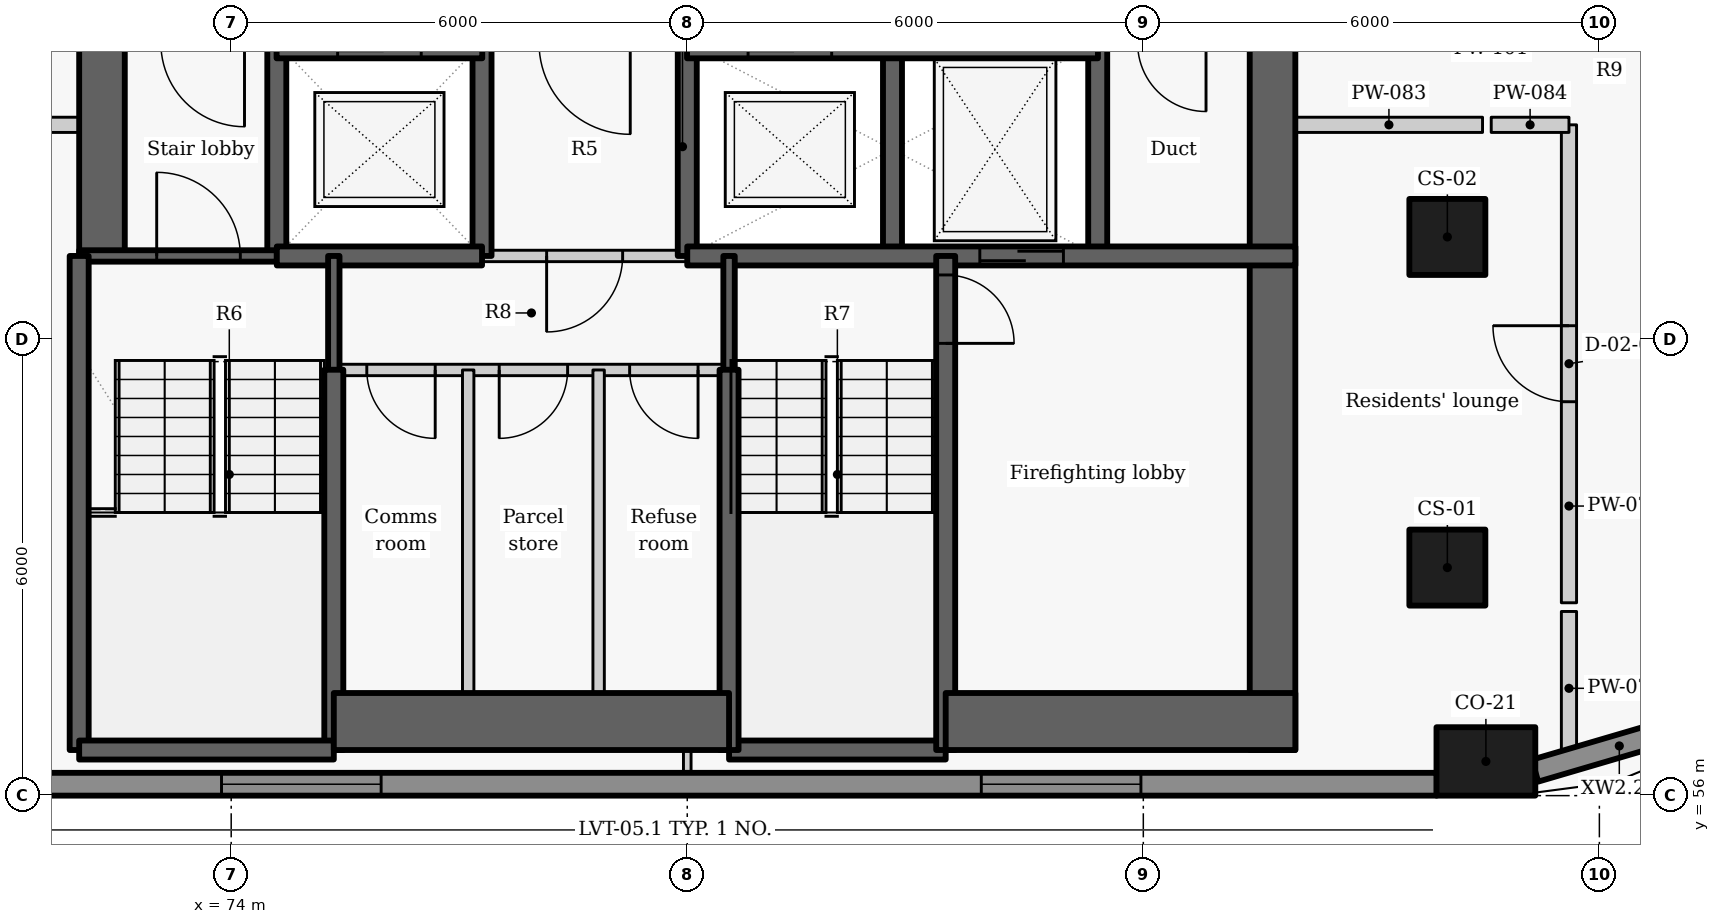
"""IFC4 building model, lengths in metres.
Left out: names, types, materials, properties, quantities, classifications, styles, units other than length and angle.
Written with IfcOpenShell. Run it as: python <this file> out.ifc"""

import sys

from ifc_helpers import new_model, si_unit, direction, frame, frame_2d, origin, origin_2d, place, context, subcontext, project, spatial, rectangle, extrude, element, fill, save


model = new_model("IFC4")
c1 = context("Model", 3, precision=1e-05, world=origin(), true_north=direction((0.0, 1.0)))
c2 = subcontext(c1, "Body", "Model", "MODEL_VIEW")
j1 = project(units=[si_unit("LENGTHUNIT", "METRE"), si_unit("PLANEANGLEUNIT", "RADIAN")], contexts=[c1])
p1 = place(None, origin())
s1 = spatial("IfcSite", under=j1, at=p1, CompositionType="ELEMENT")
p2 = place(p1, origin())
s2 = spatial("IfcBuilding", under=s1, at=p2, CompositionType="ELEMENT")
p3 = place(p2, frame((0.0, 0.0, 127.2)))
s3 = spatial("IfcBuildingStorey", under=s2, at=p3, CompositionType="ELEMENT", Elevation=127.2)
p4 = place(p3, frame((90.507, 56.45, 0.0), z_axis=(0.0, 0.0, 1.0), x_axis=(1.0, 0.0, 0.0)))
e1 = element("IfcColumn", 1, at=p4, inside=s3, PredefinedType="COLUMN", context=c2, shape_type="SweptSolid", body=[
    extrude(rectangle(XDim=1.3, YDim=0.9, at=origin_2d()), origin(), (0.0, 0.0, 1.0), 3.3),
])
for number, where, z_axis, x_axis in (
    (2, (90.0, 59.0, 0.0), (0.0, 0.0, 1.0), (0.0, 1.0, 0.0)),
    (3, (90.0, 63.35, 0.0), (0.0, 0.0, 1.0), (0.0, 1.0, 0.0)),
):
    element("IfcColumn", number, at=place(p3, frame(where, z_axis=z_axis, x_axis=x_axis)), inside=s3, PredefinedType="COLUMN", context=c2, shape_type="SweptSolid", body=[
        extrude(rectangle(XDim=1.0, YDim=1.0, at=origin_2d()), origin(), (0.0, 0.0, 1.0), 3.3),
    ])
p5 = place(p3, frame((69.821, 56.15, 0.0), z_axis=(0.0, 0.0, 1.0), x_axis=(1.0, 0.0, 0.0)))
e4 = element("IfcWall", 4, at=p5, inside=s3, PredefinedType="SOLIDWALL", context=c2, shape_type="SweptSolid", body=[
    extrude(rectangle(XDim=20.04, YDim=0.3, at=frame_2d((10.02, 0.0))), origin(), (0.0, 0.0, 1.0), 2.425),
])
p6 = place(p5, frame((4.051, 0.0, 0.9)))
e5 = element("IfcOpeningElement", 5, at=p6, cuts=e4, PredefinedType="OPENING", context=c2, shape_type="SweptSolid", body=[
    extrude(rectangle(XDim=2.1, YDim=1.1, at=frame_2d((1.05, 0.55))), frame((0.0, 0.16, 0.0), z_axis=(0.0, -1.0, 0.0), x_axis=(1.0, 0.0, 0.0)), (0.0, 0.0, 1.0), 0.32),
])
p7 = place(p5, frame((14.047, 0.0, 0.9)))
e6 = element("IfcOpeningElement", 6, at=p7, cuts=e4, PredefinedType="OPENING", context=c2, shape_type="SweptSolid", body=[
    extrude(rectangle(XDim=2.1, YDim=1.1, at=frame_2d((1.05, 0.55))), frame((0.0, 0.16, 0.0), z_axis=(0.0, -1.0, 0.0), x_axis=(1.0, 0.0, 0.0)), (0.0, 0.0, 1.0), 0.32),
])
p8 = place(p3, frame((91.153, 56.328, 0.0), z_axis=(0.0, 0.0, 1.0), x_axis=(0.959473072336, 0.281800325517, 0.0)))
e7 = element("IfcWall", 7, at=p8, inside=s3, PredefinedType="SOLIDWALL", context=c2, shape_type="SweptSolid", body=[
    extrude(rectangle(XDim=2.312, YDim=0.3, at=frame_2d((1.156, 0.0))), origin(), (0.0, 0.0, 1.0), 2.425),
])
p9 = place(p3, frame((74.6, 63.1, -0.41), z_axis=(0.0, 0.0, 1.0), x_axis=(0.0, 1.0, 0.0)))
e8 = element("IfcWall", 8, at=p9, inside=s3, PredefinedType="SHEAR", context=c2, shape_type="SweptSolid", body=[
    extrude(rectangle(XDim=2.8, YDim=0.25, at=frame_2d((1.4, 0.0))), origin(), (0.0, 0.0, 1.0), 3.435),
])
p10 = place(p3, frame((72.3, 63.1, -0.41), z_axis=(0.0, 0.0, 1.0), x_axis=(0.0, 1.0, 0.0)))
e9 = element("IfcWall", 9, at=p10, inside=s3, PredefinedType="SHEAR", context=c2, shape_type="SweptSolid", body=[
    extrude(rectangle(XDim=9.1, YDim=0.6, at=frame_2d((4.55, 0.0))), origin(), (0.0, 0.0, 1.0), 3.435),
])
p11 = place(p10, frame((3.748, 0.0, 0.41)))
e10 = element("IfcOpeningElement", 10, at=p11, cuts=e9, PredefinedType="OPENING", context=c2, shape_type="SweptSolid", body=[
    extrude(rectangle(XDim=1.5, YDim=2.1, at=frame_2d((0.75, 1.05))), frame((0.0, 0.31, 0.0), z_axis=(0.0, -1.0, 0.0), x_axis=(1.0, 0.0, 0.0)), (0.0, 0.0, 1.0), 0.62),
])
for number, where, z_axis, x_axis in (
    (11, (77.3, 63.1, -0.41), (0.0, 0.0, 1.0), (0.0, 1.0, 0.0)),
    (12, (80.0, 63.1, -0.41), (0.0, 0.0, 1.0), (0.0, 1.0, 0.0)),
    (13, (82.7, 63.1, -0.41), (0.0, 0.0, 1.0), (0.0, 1.0, 0.0)),
    (14, (85.4, 63.1, -0.41), (0.0, 0.0, 1.0), (0.0, 1.0, 0.0)),
):
    element("IfcWall", number, at=place(p3, frame(where, z_axis=z_axis, x_axis=x_axis)), inside=s3, PredefinedType="SHEAR", context=c2, shape_type="SweptSolid", body=[
        extrude(rectangle(XDim=2.8, YDim=0.25, at=frame_2d((1.4, 0.0))), origin(), (0.0, 0.0, 1.0), 3.435),
    ])
p12 = place(p3, frame((87.7, 72.2, -0.41), z_axis=(0.0, 0.0, 1.0), x_axis=(0.0, -1.0, 0.0)))
e15 = element("IfcWall", 15, at=p12, inside=s3, PredefinedType="SHEAR", context=c2, shape_type="SweptSolid", body=[
    extrude(rectangle(XDim=15.6, YDim=0.6, at=frame_2d((7.8, 0.0))), origin(), (0.0, 0.0, 1.0), 3.435),
])
p13 = place(p12, frame((3.852, 0.0, 0.41)))
e16 = element("IfcOpeningElement", 16, at=p13, cuts=e15, PredefinedType="OPENING", context=c2, shape_type="SweptSolid", body=[
    extrude(rectangle(XDim=1.5, YDim=2.1, at=frame_2d((0.75, 1.05))), frame((0.0, 0.31, 0.0), z_axis=(0.0, -1.0, 0.0), x_axis=(1.0, 0.0, 0.0)), (0.0, 0.0, 1.0), 0.62),
])
p14 = place(p3, frame((74.597, 65.9, -0.41), z_axis=(0.0, 0.0, 1.0), x_axis=(1.0, 0.0, 0.0)))
e17 = element("IfcWall", 17, at=p14, inside=s3, PredefinedType="SHEAR", context=c2, shape_type="SweptSolid", body=[
    extrude(rectangle(XDim=2.706, YDim=0.4, at=frame_2d((1.353, 0.0))), origin(), (0.0, 0.0, 1.0), 3.435),
])
p15 = place(p14, frame((0.803, 0.0, 0.41)))
e18 = element("IfcOpeningElement", 18, at=p15, cuts=e17, PredefinedType="OPENING", context=c2, shape_type="SweptSolid", body=[
    extrude(rectangle(XDim=1.1, YDim=2.1, at=frame_2d((0.55, 1.05))), frame((0.0, 0.21, 0.0), z_axis=(0.0, -1.0, 0.0), x_axis=(1.0, 0.0, 0.0)), (0.0, 0.0, 1.0), 0.42),
])
p16 = place(p3, frame((79.997, 65.9, -0.41), z_axis=(0.0, 0.0, 1.0), x_axis=(1.0, 0.0, 0.0)))
e19 = element("IfcWall", 19, at=p16, inside=s3, PredefinedType="SHEAR", context=c2, shape_type="SweptSolid", body=[
    extrude(rectangle(XDim=5.406, YDim=0.4, at=frame_2d((2.703, 0.0))), origin(), (0.0, 0.0, 1.0), 3.435),
])
p17 = place(p16, frame((0.803, 0.0, 0.41)))
e20 = element("IfcOpeningElement", 20, at=p17, cuts=e19, PredefinedType="OPENING", context=c2, shape_type="SweptSolid", body=[
    extrude(rectangle(XDim=1.1, YDim=2.1, at=frame_2d((0.55, 1.05))), frame((0.0, 0.21, 0.0), z_axis=(0.0, -1.0, 0.0), x_axis=(1.0, 0.0, 0.0)), (0.0, 0.0, 1.0), 0.42),
])
p18 = place(p3, frame((72.0, 63.1, -0.41), z_axis=(0.0, 0.0, 1.0), x_axis=(1.0, 0.0, 0.0)))
e21 = element("IfcWall", 21, at=p18, inside=s3, PredefinedType="SHEAR", context=c2, shape_type="SweptSolid", body=[
    extrude(rectangle(XDim=2.6, YDim=0.15, at=frame_2d((1.3, 0.0))), origin(), (0.0, 0.0, 1.0), 3.435),
])
p19 = place(p18, frame((1.02, 0.0, 0.41)))
e22 = element("IfcOpeningElement", 22, at=p19, cuts=e21, PredefinedType="OPENING", context=c2, shape_type="SweptSolid", body=[
    extrude(rectangle(XDim=1.1, YDim=2.1, at=frame_2d((0.55, 1.05))), frame((0.0, 0.085, 0.0), z_axis=(0.0, -1.0, 0.0), x_axis=(1.0, 0.0, 0.0)), (0.0, 0.0, 1.0), 0.17),
])
p20 = place(p3, frame((74.6, 63.1, -0.41), z_axis=(0.0, 0.0, 1.0), x_axis=(1.0, 0.0, 0.0)))
e23 = element("IfcWall", 23, at=p20, inside=s3, PredefinedType="SHEAR", context=c2, shape_type="SweptSolid", body=[
    extrude(rectangle(XDim=2.7, YDim=0.25, at=frame_2d((1.35, 0.0))), origin(), (0.0, 0.0, 1.0), 3.435),
])
p21 = place(p3, frame((80.0, 63.1, -0.41), z_axis=(0.0, 0.0, 1.0), x_axis=(1.0, 0.0, 0.0)))
e24 = element("IfcWall", 24, at=p21, inside=s3, PredefinedType="SHEAR", context=c2, shape_type="SweptSolid", body=[
    extrude(rectangle(XDim=8.0, YDim=0.25, at=frame_2d((4.0, 0.0))), origin(), (0.0, 0.0, 1.0), 3.435),
])
p22 = place(p21, frame((3.849, 0.0, 0.41)))
e25 = element("IfcOpeningElement", 25, at=p22, cuts=e24, PredefinedType="OPENING", context=c2, shape_type="SweptSolid", body=[
    extrude(rectangle(XDim=1.1, YDim=2.1, at=frame_2d((0.55, 1.05))), frame((0.0, 0.135, 0.0), z_axis=(0.0, -1.0, 0.0), x_axis=(1.0, 0.0, 0.0)), (0.0, 0.0, 1.0), 0.27),
])
p23 = place(p3, frame((80.0, 63.1, 0.0), z_axis=(0.0, 0.0, 1.0), x_axis=(-1.0, 0.0, 0.0)))
e26 = element("IfcWall", 26, at=p23, inside=s3, PredefinedType="PARTITIONING", context=c2, shape_type="SweptSolid", body=[
    extrude(rectangle(XDim=2.7, YDim=0.15, at=frame_2d((1.35, 0.0))), origin(), (0.0, 0.0, 1.0), 3.025),
])
p24 = place(p23, frame((0.85, 0.0, 0.0)))
e27 = element("IfcOpeningElement", 27, at=p24, cuts=e26, PredefinedType="OPENING", context=c2, shape_type="SweptSolid", body=[
    extrude(rectangle(XDim=1.0, YDim=2.1, at=frame_2d((0.5, 1.05))), frame((0.0, 0.085, 0.0), z_axis=(0.0, -1.0, 0.0), x_axis=(1.0, 0.0, 0.0)), (0.0, 0.0, 1.0), 0.17),
])
p25 = place(p3, frame((75.35, 61.597, -0.41), z_axis=(0.0, 0.0, 1.0), x_axis=(0.0, 1.0, 0.0)))
e28 = element("IfcWall", 28, at=p25, inside=s3, PredefinedType="SHEAR", context=c2, shape_type="SweptSolid", body=[
    extrude(rectangle(XDim=1.503, YDim=0.15, at=frame_2d((0.751, 0.0))), origin(), (0.0, 0.0, 1.0), 3.435),
])
p26 = place(p3, frame((75.35, 56.6, -0.41), z_axis=(0.0, 0.0, 1.0), x_axis=(0.0, 1.0, 0.0)))
e29 = element("IfcWall", 29, at=p26, inside=s3, PredefinedType="SHEAR", context=c2, shape_type="SweptSolid", body=[
    extrude(rectangle(XDim=5.003, YDim=0.25, at=frame_2d((2.501, 0.0))), origin(), (0.0, 0.0, 1.0), 3.435),
])
p27 = place(p3, frame((72.0, 56.6, -0.41), z_axis=(0.0, 0.0, 1.0), x_axis=(0.0, 1.0, 0.0)))
e30 = element("IfcWall", 30, at=p27, inside=s3, PredefinedType="SHEAR", context=c2, shape_type="SweptSolid", body=[
    extrude(rectangle(XDim=6.5, YDim=0.25, at=frame_2d((3.25, 0.0))), origin(), (0.0, 0.0, 1.0), 3.435),
])
p28 = place(p3, frame((72.0, 56.6, 0.0), z_axis=(0.0, 0.0, 1.0), x_axis=(1.0, 0.0, 0.0)))
e31 = element("IfcWall", 31, at=p28, inside=s3, PredefinedType="SHEAR", context=c2, shape_type="SweptSolid", body=[
    extrude(rectangle(XDim=3.35, YDim=0.25, at=frame_2d((1.675, 0.0))), origin(), (0.0, 0.0, 1.0), 3.025),
])
p29 = place(p3, frame((80.55, 56.6, 0.0), z_axis=(0.0, 0.0, 1.0), x_axis=(1.0, 0.0, 0.0)))
e32 = element("IfcWall", 32, at=p29, inside=s3, PredefinedType="SHEAR", context=c2, shape_type="SweptSolid", body=[
    extrude(rectangle(XDim=2.85, YDim=0.25, at=frame_2d((1.425, 0.0))), origin(), (0.0, 0.0, 1.0), 3.025),
])
p30 = place(p3, frame((83.4, 63.1, -0.41), z_axis=(0.0, 0.0, 1.0), x_axis=(0.0, -1.0, 0.0)))
e33 = element("IfcWall", 33, at=p30, inside=s3, PredefinedType="SHEAR", context=c2, shape_type="SweptSolid", body=[
    extrude(rectangle(XDim=6.5, YDim=0.25, at=frame_2d((3.25, 0.0))), origin(), (0.0, 0.0, 1.0), 3.435),
])
p31 = place(p30, frame((0.25, 0.0, 0.41)))
e34 = element("IfcOpeningElement", 34, at=p31, cuts=e33, PredefinedType="OPENING", context=c2, shape_type="SweptSolid", body=[
    extrude(rectangle(XDim=0.9, YDim=2.1, at=frame_2d((0.45, 1.05))), frame((0.0, 0.135, 0.0), z_axis=(0.0, -1.0, 0.0), x_axis=(1.0, 0.0, 0.0)), (0.0, 0.0, 1.0), 0.27),
])
p32 = place(p3, frame((80.55, 61.597, -0.41), z_axis=(0.0, 0.0, 1.0), x_axis=(0.0, 1.0, 0.0)))
e35 = element("IfcWall", 35, at=p32, inside=s3, PredefinedType="SHEAR", context=c2, shape_type="SweptSolid", body=[
    extrude(rectangle(XDim=1.503, YDim=0.15, at=frame_2d((0.751, 0.0))), origin(), (0.0, 0.0, 1.0), 3.435),
])
p33 = place(p3, frame((80.55, 56.6, -0.41), z_axis=(0.0, 0.0, 1.0), x_axis=(0.0, 1.0, 0.0)))
e36 = element("IfcWall", 36, at=p33, inside=s3, PredefinedType="SHEAR", context=c2, shape_type="SweptSolid", body=[
    extrude(rectangle(XDim=5.003, YDim=0.25, at=frame_2d((2.501, 0.0))), origin(), (0.0, 0.0, 1.0), 3.435),
])
p34 = place(p3, frame((75.35, 56.975, -0.41), z_axis=(0.0, 0.0, 1.0), x_axis=(1.0, 0.0, 0.0)))
e37 = element("IfcWall", 37, at=p34, inside=s3, PredefinedType="SHEAR", context=c2, shape_type="SweptSolid", body=[
    extrude(rectangle(XDim=5.2, YDim=0.75, at=frame_2d((2.6, 0.0))), origin(), (0.0, 0.0, 1.0), 3.435),
])
p35 = place(p3, frame((83.4, 56.975, -0.41), z_axis=(0.0, 0.0, 1.0), x_axis=(1.0, 0.0, 0.0)))
e38 = element("IfcWall", 38, at=p35, inside=s3, PredefinedType="SHEAR", context=c2, shape_type="SweptSolid", body=[
    extrude(rectangle(XDim=4.6, YDim=0.75, at=frame_2d((2.3, 0.0))), origin(), (0.0, 0.0, 1.0), 3.435),
])
p36 = place(p3, frame((80.55, 61.6, 0.0), z_axis=(0.0, 0.0, 1.0), x_axis=(-1.0, 0.0, 0.0)))
e39 = element("IfcWall", 39, at=p36, inside=s3, PredefinedType="PARTITIONING", context=c2, shape_type="SweptSolid", body=[
    extrude(rectangle(XDim=5.2, YDim=0.15, at=frame_2d((2.6, 0.0))), origin(), (0.0, 0.0, 1.0), 3.025),
])
p37 = place(p36, frame((3.866, 0.0, 0.0)))
e40 = element("IfcOpeningElement", 40, at=p37, cuts=e39, PredefinedType="OPENING", context=c2, shape_type="SweptSolid", body=[
    extrude(rectangle(XDim=0.9, YDim=2.1, at=frame_2d((0.45, 1.05))), frame((0.0, 0.085, 0.0), z_axis=(0.0, -1.0, 0.0), x_axis=(1.0, 0.0, 0.0)), (0.0, 0.0, 1.0), 0.17),
])
p38 = place(p36, frame((2.124, 0.0, 0.0)))
e41 = element("IfcOpeningElement", 41, at=p38, cuts=e39, PredefinedType="OPENING", context=c2, shape_type="SweptSolid", body=[
    extrude(rectangle(XDim=0.9, YDim=2.1, at=frame_2d((0.45, 1.05))), frame((0.0, 0.085, 0.0), z_axis=(0.0, -1.0, 0.0), x_axis=(1.0, 0.0, 0.0)), (0.0, 0.0, 1.0), 0.17),
])
p39 = place(p36, frame((0.408, 0.0, 0.0)))
e42 = element("IfcOpeningElement", 42, at=p39, cuts=e39, PredefinedType="OPENING", context=c2, shape_type="SweptSolid", body=[
    extrude(rectangle(XDim=0.9, YDim=2.1, at=frame_2d((0.45, 1.05))), frame((0.0, 0.085, 0.0), z_axis=(0.0, -1.0, 0.0), x_axis=(1.0, 0.0, 0.0)), (0.0, 0.0, 1.0), 0.17),
])
for number, where, z_axis, x_axis in (
    (43, (77.118, 56.6, 0.0), (0.0, 0.0, 1.0), (0.0, 1.0, 0.0)),
    (44, (78.834, 56.6, 0.0), (0.0, 0.0, 1.0), (0.0, 1.0, 0.0)),
):
    element("IfcWall", number, at=place(p3, frame(where, z_axis=z_axis, x_axis=x_axis)), inside=s3, PredefinedType="PARTITIONING", context=c2, shape_type="SweptSolid", body=[
        extrude(rectangle(XDim=5.0, YDim=0.15, at=frame_2d((2.5, 0.0))), origin(), (0.0, 0.0, 1.0), 3.025),
    ])
p40 = place(p3, frame((91.6, 56.401, 0.0), z_axis=(0.0, 0.0, 1.0), x_axis=(0.0, 1.0, 0.0)))
e45 = element("IfcWall", 45, at=p40, inside=s3, PredefinedType="PARTITIONING", context=c2, shape_type="SweptSolid", body=[
    extrude(rectangle(XDim=2.022, YDim=0.2, at=frame_2d((1.011, 0.0))), origin(), (0.0, 0.0, 1.0), 2.405),
])
p41 = place(p3, frame((91.6, 58.537, 0.0), z_axis=(0.0, 0.0, 1.0), x_axis=(0.0, 1.0, 0.0)))
e46 = element("IfcWall", 46, at=p41, inside=s3, PredefinedType="PARTITIONING", context=c2, shape_type="SweptSolid", body=[
    extrude(rectangle(XDim=6.288, YDim=0.2, at=frame_2d((3.144, 0.0))), origin(), (0.0, 0.0, 1.0), 3.025),
])
p42 = place(p41, frame((2.645, 0.0, 0.0)))
e47 = element("IfcOpeningElement", 47, at=p42, cuts=e46, PredefinedType="OPENING", context=c2, shape_type="SweptSolid", body=[
    extrude(rectangle(XDim=1.0, YDim=2.1, at=frame_2d((0.5, 1.05))), frame((0.0, 0.11, 0.0), z_axis=(0.0, -1.0, 0.0), x_axis=(1.0, 0.0, 0.0)), (0.0, 0.0, 1.0), 0.22),
])
p43 = place(p3, frame((70.577, 64.825, 0.0), z_axis=(0.0, 0.0, 1.0), x_axis=(1.0, 0.0, 0.0)))
e48 = element("IfcWall", 48, at=p43, inside=s3, PredefinedType="PARTITIONING", context=c2, shape_type="SweptSolid", body=[
    extrude(rectangle(XDim=1.423, YDim=0.2, at=frame_2d((0.711, 0.0))), origin(), (0.0, 0.0, 1.0), 3.025),
])
p44 = place(p3, frame((88.0, 64.825, 0.0), z_axis=(0.0, 0.0, 1.0), x_axis=(1.0, 0.0, 0.0)))
e49 = element("IfcWall", 49, at=p44, inside=s3, PredefinedType="PARTITIONING", context=c2, shape_type="SweptSolid", body=[
    extrude(rectangle(XDim=2.463, YDim=0.2, at=frame_2d((1.231, 0.0))), origin(), (0.0, 0.0, 1.0), 2.505),
])
p45 = place(p3, frame((90.577, 64.825, 0.0), z_axis=(0.0, 0.0, 1.0), x_axis=(1.0, 0.0, 0.0)))
e50 = element("IfcWall", 50, at=p45, inside=s3, PredefinedType="PARTITIONING", context=c2, shape_type="SweptSolid", body=[
    extrude(rectangle(XDim=1.023, YDim=0.2, at=frame_2d((0.511, 0.0))), origin(), (0.0, 0.0, 1.0), 3.025),
])
p46 = place(p3, frame((80.0, 56.3, 0.0), z_axis=(0.0, 0.0, 1.0), x_axis=(0.0, 1.0, 0.0)))
e51 = element("IfcWall", 51, at=p46, inside=s3, PredefinedType="PARTITIONING", context=c2, shape_type="SweptSolid", body=[
    extrude(rectangle(XDim=0.3, YDim=0.1, at=frame_2d((0.15, 0.0))), origin(), (0.0, 0.0, 1.0), 3.025),
])
p47 = place(p6, origin())
e52 = element("IfcWindow", 52, at=p47, inside=s3, PartitioningType="SINGLE_PANEL", PredefinedType="WINDOW", context=c2, shape_type="SweptSolid", body=[
    extrude(rectangle(XDim=2.1, YDim=1.1, at=frame_2d((1.05, 0.55))), frame((0.0, 0.03, 0.0), z_axis=(0.0, -1.0, 0.0), x_axis=(1.0, 0.0, 0.0)), (0.0, 0.0, 1.0), 0.06),
])
fill(e5, e52)
p48 = place(p7, origin())
e53 = element("IfcWindow", 53, at=p48, inside=s3, PartitioningType="SINGLE_PANEL", PredefinedType="WINDOW", context=c2, shape_type="SweptSolid", body=[
    extrude(rectangle(XDim=2.1, YDim=1.1, at=frame_2d((1.05, 0.55))), frame((0.0, 0.03, 0.0), z_axis=(0.0, -1.0, 0.0), x_axis=(1.0, 0.0, 0.0)), (0.0, 0.0, 1.0), 0.06),
])
fill(e6, e53)
p49 = place(p22, origin())
e54 = element("IfcDoor", 54, at=p49, inside=s3, OperationType="SLIDING_TO_LEFT", PredefinedType="DOOR", context=c2, shape_type="SweptSolid", body=[
    extrude(rectangle(XDim=1.1, YDim=2.1, at=frame_2d((0.55, 1.05))), frame((0.0, 0.025, 0.0), z_axis=(0.0, -1.0, 0.0), x_axis=(1.0, 0.0, 0.0)), (0.0, 0.0, 1.0), 0.05),
])
fill(e25, e54)
p50 = place(p24, origin())
e55 = element("IfcDoor", 55, at=p50, inside=s3, OperationType="SINGLE_SWING_RIGHT", PredefinedType="DOOR", context=c2, shape_type="SweptSolid", body=[
    extrude(rectangle(XDim=1.0, YDim=2.1, at=frame_2d((0.5, 1.05))), frame((0.0, 0.025, 0.0), z_axis=(0.0, -1.0, 0.0), x_axis=(1.0, 0.0, 0.0)), (0.0, 0.0, 1.0), 0.05),
])
fill(e27, e55)
p51 = place(p37, origin())
e56 = element("IfcDoor", 56, at=p51, inside=s3, OperationType="SINGLE_SWING_LEFT", PredefinedType="DOOR", context=c2, shape_type="SweptSolid", body=[
    extrude(rectangle(XDim=0.9, YDim=2.1, at=frame_2d((0.45, 1.05))), frame((0.0, 0.025, 0.0), z_axis=(0.0, -1.0, 0.0), x_axis=(1.0, 0.0, 0.0)), (0.0, 0.0, 1.0), 0.05),
])
fill(e40, e56)
p52 = place(p38, origin())
e57 = element("IfcDoor", 57, at=p52, inside=s3, OperationType="SINGLE_SWING_RIGHT", PredefinedType="DOOR", context=c2, shape_type="SweptSolid", body=[
    extrude(rectangle(XDim=0.9, YDim=2.1, at=frame_2d((0.45, 1.05))), frame((0.0, 0.025, 0.0), z_axis=(0.0, -1.0, 0.0), x_axis=(1.0, 0.0, 0.0)), (0.0, 0.0, 1.0), 0.05),
])
fill(e41, e57)
p53 = place(p39, origin())
e58 = element("IfcDoor", 58, at=p53, inside=s3, OperationType="SINGLE_SWING_LEFT", PredefinedType="DOOR", context=c2, shape_type="SweptSolid", body=[
    extrude(rectangle(XDim=0.9, YDim=2.1, at=frame_2d((0.45, 1.05))), frame((0.0, 0.025, 0.0), z_axis=(0.0, -1.0, 0.0), x_axis=(1.0, 0.0, 0.0)), (0.0, 0.0, 1.0), 0.05),
])
fill(e42, e58)
p54 = place(p19, origin())
e59 = element("IfcDoor", 59, at=p54, inside=s3, OperationType="SINGLE_SWING_LEFT", PredefinedType="DOOR", context=c2, shape_type="SweptSolid", body=[
    extrude(rectangle(XDim=1.1, YDim=2.1, at=frame_2d((0.55, 1.05))), frame((0.0, 0.025, 0.0), z_axis=(0.0, -1.0, 0.0), x_axis=(1.0, 0.0, 0.0)), (0.0, 0.0, 1.0), 0.05),
])
fill(e22, e59)
p55 = place(p31, origin())
e60 = element("IfcDoor", 60, at=p55, inside=s3, OperationType="SINGLE_SWING_RIGHT", PredefinedType="DOOR", context=c2, shape_type="SweptSolid", body=[
    extrude(rectangle(XDim=0.9, YDim=2.1, at=frame_2d((0.45, 1.05))), frame((0.0, 0.025, 0.0), z_axis=(0.0, -1.0, 0.0), x_axis=(1.0, 0.0, 0.0)), (0.0, 0.0, 1.0), 0.05),
])
fill(e34, e60)
p56 = place(p42, origin())
e61 = element("IfcDoor", 61, at=p56, inside=s3, OperationType="SINGLE_SWING_RIGHT", PredefinedType="DOOR", context=c2, shape_type="SweptSolid", body=[
    extrude(rectangle(XDim=1.0, YDim=2.1, at=frame_2d((0.5, 1.05))), frame((0.0, 0.025, 0.0), z_axis=(0.0, -1.0, 0.0), x_axis=(1.0, 0.0, 0.0)), (0.0, 0.0, 1.0), 0.05),
])
fill(e47, e61)
save(model, sys.argv[1])
